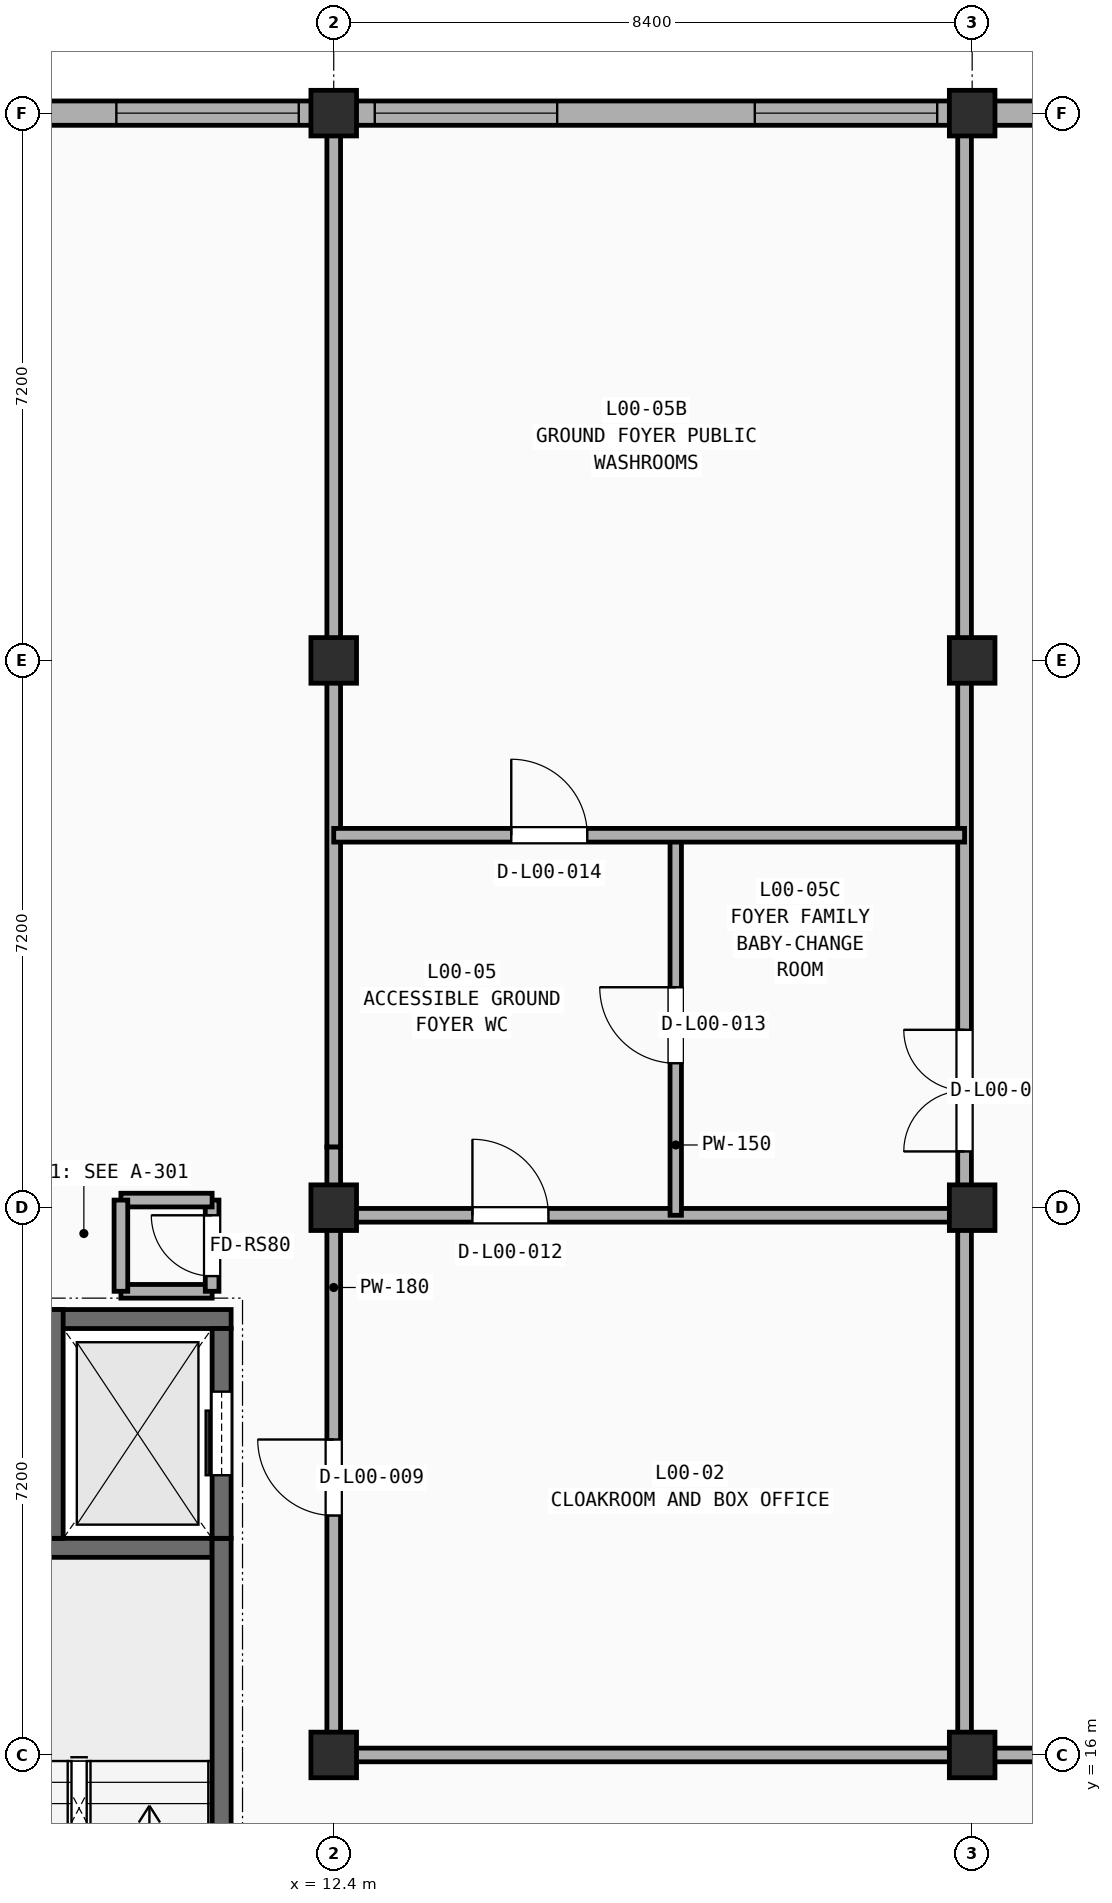
"""IFC4 building model, lengths in metres.
Left out: names, types, materials, properties, quantities, classifications, styles, units other than length and angle.
Written with IfcOpenShell. Run it as: python <this file> out.ifc"""

import sys

from ifc_helpers import new_model, si_unit, direction, frame, frame_2d, origin, origin_2d, place, context, subcontext, project, spatial, rectangle, extrude, element, fill, save


model = new_model("IFC4")
c1 = context("Model", 3, precision=1e-05, world=origin(), true_north=direction((0.0, 1.0)))
c2 = subcontext(c1, "Body", "Model", "MODEL_VIEW")
j1 = project(units=[si_unit("LENGTHUNIT", "METRE"), si_unit("PLANEANGLEUNIT", "RADIAN")], contexts=[c1])
p1 = place(None, origin())
s1 = spatial("IfcSite", under=j1, at=p1, CompositionType="ELEMENT")
p2 = place(p1, origin())
s2 = spatial("IfcBuilding", under=s1, at=p2, CompositionType="ELEMENT")
p3 = place(p2, origin())
s3 = spatial("IfcBuildingStorey", under=s2, at=p3, CompositionType="ELEMENT", Elevation=0.0)
for number, where, z_axis, x_axis in (
    (1, (12.4, 16.0, 0.0), (0.0, 0.0, 1.0), (1.0, 0.0, 0.0)),
    (2, (12.4, 23.2, 0.0), (0.0, 0.0, 1.0), (1.0, 0.0, 0.0)),
    (3, (12.4, 30.4, 0.0), (0.0, 0.0, 1.0), (1.0, 0.0, 0.0)),
    (4, (12.4, 37.6, 0.0), (0.0, 0.0, 1.0), (1.0, 0.0, 0.0)),
    (5, (20.8, 16.0, 0.0), (0.0, 0.0, 1.0), (1.0, 0.0, 0.0)),
    (6, (20.8, 23.2, 0.0), (0.0, 0.0, 1.0), (1.0, 0.0, 0.0)),
    (7, (20.8, 30.4, 0.0), (0.0, 0.0, 1.0), (1.0, 0.0, 0.0)),
    (8, (20.8, 37.6, 0.0), (0.0, 0.0, 1.0), (1.0, 0.0, 0.0)),
):
    element("IfcColumn", number, at=place(p3, frame(where, z_axis=z_axis, x_axis=x_axis)), inside=s3, PredefinedType="COLUMN", context=c2, shape_type="SweptSolid", body=[
        extrude(rectangle(XDim=0.6, YDim=0.6, at=origin_2d()), origin(), (0.0, 0.0, 1.0), 5.4),
    ])
p4 = place(p3, frame((12.4, 16.0, 0.0), z_axis=(0.0, 0.0, 1.0), x_axis=(1.0, 0.0, 0.0)))
e9 = element("IfcWall", 9, at=p4, inside=s3, PredefinedType="PARTITIONING", context=c2, shape_type="SweptSolid", body=[
    extrude(rectangle(XDim=33.45, YDim=0.18, at=frame_2d((16.725, 0.0))), origin(), (0.0, 0.0, 1.0), 3.99),
])
p5 = place(p4, frame((11.147, 0.0, -0.01)))
e10 = element("IfcOpeningElement", 10, at=p5, cuts=e9, PredefinedType="OPENING", context=c2, shape_type="SweptSolid", body=[
    extrude(rectangle(XDim=1.6, YDim=2.21, at=frame_2d((0.8, 1.105))), frame((0.0, 0.1, 0.0), z_axis=(0.0, -1.0, 0.0), x_axis=(1.0, 0.0, 0.0)), (0.0, 0.0, 1.0), 0.2),
])
p6 = place(p3, frame((12.4, 16.0, 0.0), z_axis=(0.0, 0.0, 1.0), x_axis=(0.0, 1.0, 0.0)))
e11 = element("IfcWall", 11, at=p6, inside=s3, PredefinedType="PARTITIONING", context=c2, shape_type="SweptSolid", body=[
    extrude(rectangle(XDim=8.0, YDim=0.18, at=frame_2d((4.0, 0.0))), origin(), (0.0, 0.0, 1.0), 4.54),
])
p7 = place(p6, frame((3.15, 0.0, -0.01)))
e12 = element("IfcOpeningElement", 12, at=p7, cuts=e11, PredefinedType="OPENING", context=c2, shape_type="SweptSolid", body=[
    extrude(rectangle(XDim=1.0, YDim=2.16, at=frame_2d((0.5, 1.08))), frame((0.0, 0.1, 0.0), z_axis=(0.0, -1.0, 0.0), x_axis=(1.0, 0.0, 0.0)), (0.0, 0.0, 1.0), 0.2),
])
p8 = place(p3, frame((12.4, 24.0, 0.0), z_axis=(0.0, 0.0, 1.0), x_axis=(0.0, 1.0, 0.0)))
e13 = element("IfcWall", 13, at=p8, inside=s3, PredefinedType="PARTITIONING", context=c2, shape_type="SweptSolid", body=[
    extrude(rectangle(XDim=13.45, YDim=0.18, at=frame_2d((6.725, 0.0))), origin(), (0.0, 0.0, 1.0), 4.54),
])
p9 = place(p3, frame((20.7, 16.0, 0.0), z_axis=(0.0, 0.0, 1.0), x_axis=(0.0, 1.0, 0.0)))
e14 = element("IfcWall", 14, at=p9, inside=s3, PredefinedType="PARTITIONING", context=c2, shape_type="SweptSolid", body=[
    extrude(rectangle(XDim=21.45, YDim=0.18, at=frame_2d((10.725, 0.0))), origin(), (0.0, 0.0, 1.0), 4.54),
])
p10 = place(p9, frame((7.94, 0.0, -0.01)))
e15 = element("IfcOpeningElement", 15, at=p10, cuts=e14, PredefinedType="OPENING", context=c2, shape_type="SweptSolid", body=[
    extrude(rectangle(XDim=1.6, YDim=2.21, at=frame_2d((0.8, 1.105))), frame((0.0, 0.1, 0.0), z_axis=(0.0, -1.0, 0.0), x_axis=(1.0, 0.0, 0.0)), (0.0, 0.0, 1.0), 0.2),
])
p11 = place(p3, frame((12.4, 23.1, 0.0), z_axis=(0.0, 0.0, 1.0), x_axis=(1.0, 0.0, 0.0)))
e16 = element("IfcWall", 16, at=p11, inside=s3, PredefinedType="PARTITIONING", context=c2, shape_type="SweptSolid", body=[
    extrude(rectangle(XDim=8.3, YDim=0.18, at=frame_2d((4.15, 0.0))), origin(), (0.0, 0.0, 1.0), 4.54),
])
p12 = place(p11, frame((1.825, 0.0, -0.01)))
e17 = element("IfcOpeningElement", 17, at=p12, cuts=e16, PredefinedType="OPENING", context=c2, shape_type="SweptSolid", body=[
    extrude(rectangle(XDim=1.0, YDim=2.16, at=frame_2d((0.5, 1.08))), frame((0.0, 0.1, 0.0), z_axis=(0.0, -1.0, 0.0), x_axis=(1.0, 0.0, 0.0)), (0.0, 0.0, 1.0), 0.2),
])
p13 = place(p3, frame((16.9, 23.1, 0.0), z_axis=(0.0, 0.0, 1.0), x_axis=(0.0, 1.0, 0.0)))
e18 = element("IfcWall", 18, at=p13, inside=s3, PredefinedType="PARTITIONING", context=c2, shape_type="SweptSolid", body=[
    extrude(rectangle(XDim=5.0, YDim=0.15, at=frame_2d((2.5, 0.0))), origin(), (0.0, 0.0, 1.0), 4.54),
])
p14 = place(p13, frame((2.0, 0.0, -0.01)))
e19 = element("IfcOpeningElement", 19, at=p14, cuts=e18, PredefinedType="OPENING", context=c2, shape_type="SweptSolid", body=[
    extrude(rectangle(XDim=1.0, YDim=2.16, at=frame_2d((0.5, 1.08))), frame((0.0, 0.085, 0.0), z_axis=(0.0, -1.0, 0.0), x_axis=(1.0, 0.0, 0.0)), (0.0, 0.0, 1.0), 0.17),
])
p15 = place(p3, frame((12.4, 28.1, 0.0), z_axis=(0.0, 0.0, 1.0), x_axis=(1.0, 0.0, 0.0)))
e20 = element("IfcWall", 20, at=p15, inside=s3, PredefinedType="PARTITIONING", context=c2, shape_type="SweptSolid", body=[
    extrude(rectangle(XDim=8.3, YDim=0.18, at=frame_2d((4.15, 0.0))), origin(), (0.0, 0.0, 1.0), 4.64),
])
p16 = place(p15, frame((2.336, 0.0, -0.01)))
e21 = element("IfcOpeningElement", 21, at=p16, cuts=e20, PredefinedType="OPENING", context=c2, shape_type="SweptSolid", body=[
    extrude(rectangle(XDim=1.0, YDim=2.16, at=frame_2d((0.5, 1.08))), frame((0.0, 0.1, 0.0), z_axis=(0.0, -1.0, 0.0), x_axis=(1.0, 0.0, 0.0)), (0.0, 0.0, 1.0), 0.2),
])
p17 = place(p3, frame((12.4, 37.6, 0.0), z_axis=(0.0, 0.0, 1.0), x_axis=(-1.0, 0.0, 0.0)))
e22 = element("IfcWall", 22, at=p17, inside=s3, PredefinedType="SOLIDWALL", context=c2, shape_type="SweptSolid", body=[
    extrude(rectangle(XDim=8.4, YDim=0.32, at=frame_2d((4.2, 0.0))), origin(), (0.0, 0.0, 1.0), 4.64),
])
p18 = place(p17, frame((0.46, 0.0, 0.9)))
e23 = element("IfcOpeningElement", 23, at=p18, cuts=e22, PredefinedType="OPENING", context=c2, shape_type="SweptSolid", body=[
    extrude(rectangle(XDim=2.4, YDim=2.35, at=frame_2d((1.2, 1.175))), frame((0.0, 0.17, 0.0), z_axis=(0.0, -1.0, 0.0), x_axis=(1.0, 0.0, 0.0)), (0.0, 0.0, 1.0), 0.34),
])
p19 = place(p17, frame((5.46, 0.0, 0.9)))
e24 = element("IfcOpeningElement", 24, at=p19, cuts=e22, PredefinedType="OPENING", context=c2, shape_type="SweptSolid", body=[
    extrude(rectangle(XDim=2.4, YDim=2.35, at=frame_2d((1.2, 1.175))), frame((0.0, 0.17, 0.0), z_axis=(0.0, -1.0, 0.0), x_axis=(1.0, 0.0, 0.0)), (0.0, 0.0, 1.0), 0.34),
])
p20 = place(p3, frame((20.8, 37.6, 0.0), z_axis=(0.0, 0.0, 1.0), x_axis=(-1.0, 0.0, 0.0)))
e25 = element("IfcWall", 25, at=p20, inside=s3, PredefinedType="SOLIDWALL", context=c2, shape_type="SweptSolid", body=[
    extrude(rectangle(XDim=8.4, YDim=0.32, at=frame_2d((4.2, 0.0))), origin(), (0.0, 0.0, 1.0), 4.64),
])
p21 = place(p20, frame((0.46, 0.0, 0.9)))
e26 = element("IfcOpeningElement", 26, at=p21, cuts=e25, PredefinedType="OPENING", context=c2, shape_type="SweptSolid", body=[
    extrude(rectangle(XDim=2.4, YDim=2.35, at=frame_2d((1.2, 1.175))), frame((0.0, 0.17, 0.0), z_axis=(0.0, -1.0, 0.0), x_axis=(1.0, 0.0, 0.0)), (0.0, 0.0, 1.0), 0.34),
])
p22 = place(p20, frame((5.46, 0.0, 0.9)))
e27 = element("IfcOpeningElement", 27, at=p22, cuts=e25, PredefinedType="OPENING", context=c2, shape_type="SweptSolid", body=[
    extrude(rectangle(XDim=2.4, YDim=2.35, at=frame_2d((1.2, 1.175))), frame((0.0, 0.17, 0.0), z_axis=(0.0, -1.0, 0.0), x_axis=(1.0, 0.0, 0.0)), (0.0, 0.0, 1.0), 0.34),
])
p23 = place(p3, frame((29.2, 37.6, 0.0), z_axis=(0.0, 0.0, 1.0), x_axis=(-1.0, 0.0, 0.0)))
e28 = element("IfcWall", 28, at=p23, inside=s3, PredefinedType="SOLIDWALL", context=c2, shape_type="SweptSolid", body=[
    extrude(rectangle(XDim=8.4, YDim=0.32, at=frame_2d((4.2, 0.0))), origin(), (0.0, 0.0, 1.0), 4.64),
])
p24 = place(p23, frame((3.2, 0.0, -0.01)))
e29 = element("IfcOpeningElement", 29, at=p24, cuts=e28, PredefinedType="OPENING", context=c2, shape_type="SweptSolid", body=[
    extrude(rectangle(XDim=2.0, YDim=2.41, at=frame_2d((1.0, 1.205))), frame((0.0, 0.17, 0.0), z_axis=(0.0, -1.0, 0.0), x_axis=(1.0, 0.0, 0.0)), (0.0, 0.0, 1.0), 0.34),
])
p25 = place(p3, frame((10.8, 18.725, 0.0), z_axis=(0.0, 0.0, 1.0), x_axis=(-1.0, 0.0, 0.0)))
e30 = element("IfcWall", 30, at=p25, inside=s3, PredefinedType="SHEAR", context=c2, shape_type="SweptSolid", body=[
    extrude(rectangle(XDim=3.5, YDim=0.25, at=frame_2d((1.75, 0.0))), origin(), (0.0, 0.0, 1.0), 5.4),
])
p26 = place(p3, frame((10.925, 9.95, 0.0), z_axis=(0.0, 0.0, 1.0), x_axis=(0.0, 1.0, 0.0)))
e31 = element("IfcWall", 31, at=p26, inside=s3, PredefinedType="SHEAR", context=c2, shape_type="SweptSolid", body=[
    extrude(rectangle(XDim=8.9, YDim=0.25, at=frame_2d((4.45, 0.0))), origin(), (0.0, 0.0, 1.0), 5.4),
])
p27 = place(p3, frame((8.59, 21.735, 0.0), z_axis=(0.0, 0.0, 1.0), x_axis=(1.0, 0.0, 0.0)))
e32 = element("IfcWall", 32, at=p27, inside=s3, PredefinedType="SHEAR", context=c2, shape_type="SweptSolid", body=[
    extrude(rectangle(XDim=2.46, YDim=0.25, at=frame_2d((1.23, 0.0))), origin(), (0.0, 0.0, 1.0), 5.4),
])
p28 = place(p3, frame((10.925, 18.85, 0.0), z_axis=(0.0, 0.0, 1.0), x_axis=(0.0, 1.0, 0.0)))
e33 = element("IfcWall", 33, at=p28, inside=s3, PredefinedType="SHEAR", context=c2, shape_type="SweptSolid", body=[
    extrude(rectangle(XDim=2.76, YDim=0.25, at=frame_2d((1.38, 0.0))), origin(), (0.0, 0.0, 1.0), 5.4),
])
p29 = place(p28, frame((0.83, 0.0, -0.01)))
e34 = element("IfcOpeningElement", 34, at=p29, cuts=e33, PredefinedType="OPENING", context=c2, shape_type="SweptSolid", body=[
    extrude(rectangle(XDim=1.1, YDim=2.16, at=frame_2d((0.55, 1.08))), frame((0.0, 0.135, 0.0), z_axis=(0.0, -1.0, 0.0), x_axis=(1.0, 0.0, 0.0)), (0.0, 0.0, 1.0), 0.27),
])
p30 = place(p3, frame((8.715, 18.85, 0.0), z_axis=(0.0, 0.0, 1.0), x_axis=(0.0, 1.0, 0.0)))
e35 = element("IfcWall", 35, at=p30, inside=s3, PredefinedType="SHEAR", context=c2, shape_type="SweptSolid", body=[
    extrude(rectangle(XDim=3.01, YDim=0.25, at=frame_2d((1.505, 0.0))), origin(), (0.0, 0.0, 1.0), 5.4),
])
p31 = place(p3, frame((9.6, 22.1, 0.0), z_axis=(0.0, 0.0, 1.0), x_axis=(1.0, 0.0, 0.0)))
e36 = element("IfcWall", 36, at=p31, inside=s3, PredefinedType="SOLIDWALL", context=c2, shape_type="SweptSolid", body=[
    extrude(rectangle(XDim=1.2, YDim=0.18, at=frame_2d((0.6, 0.0))), origin(), (0.0, 0.0, 1.0), 5.07),
])
p32 = place(p3, frame((10.8, 22.1, 0.0), z_axis=(0.0, 0.0, 1.0), x_axis=(0.0, 1.0, 0.0)))
e37 = element("IfcWall", 37, at=p32, inside=s3, PredefinedType="SOLIDWALL", context=c2, shape_type="SweptSolid", body=[
    extrude(rectangle(XDim=1.2, YDim=0.18, at=frame_2d((0.6, 0.0))), origin(), (0.0, 0.0, 1.0), 5.07),
])
p33 = place(p32, frame((0.2, 0.0, -0.01)))
e38 = element("IfcOpeningElement", 38, at=p33, cuts=e37, PredefinedType="OPENING", context=c2, shape_type="SweptSolid", body=[
    extrude(rectangle(XDim=0.8, YDim=2.06, at=frame_2d((0.4, 1.03))), frame((0.0, 0.1, 0.0), z_axis=(0.0, -1.0, 0.0), x_axis=(1.0, 0.0, 0.0)), (0.0, 0.0, 1.0), 0.2),
])
for number, where, z_axis, x_axis in (
    (39, (10.8, 23.3, 0.0), (0.0, 0.0, 1.0), (-1.0, 0.0, 0.0)),
    (40, (9.6, 23.3, 0.0), (0.0, 0.0, 1.0), (0.0, -1.0, 0.0)),
):
    element("IfcWall", number, at=place(p3, frame(where, z_axis=z_axis, x_axis=x_axis)), inside=s3, PredefinedType="SOLIDWALL", context=c2, shape_type="SweptSolid", body=[
        extrude(rectangle(XDim=1.2, YDim=0.18, at=frame_2d((0.6, 0.0))), origin(), (0.0, 0.0, 1.0), 5.07),
    ])
p34 = place(p7, frame((1.0, 0.0, 0.01), z_axis=(0.0, 0.0, 1.0), x_axis=(-1.0, 0.0, 0.0)))
e41 = element("IfcDoor", 41, at=p34, inside=s3, OperationType="SINGLE_SWING_RIGHT", PredefinedType="DOOR", context=c2, shape_type="SweptSolid", body=[
    extrude(rectangle(XDim=1.0, YDim=2.15, at=frame_2d((0.5, 1.075))), frame((0.0, 0.025, 0.0), z_axis=(0.0, -1.0, 0.0), x_axis=(1.0, 0.0, 0.0)), (0.0, 0.0, 1.0), 0.05),
])
fill(e12, e41)
p35 = place(p10, frame((0.0, 0.0, 0.01)))
e42 = element("IfcDoor", 42, at=p35, inside=s3, OperationType="DOUBLE_SWING_LEFT", PredefinedType="DOOR", context=c2, shape_type="SweptSolid", body=[
    extrude(rectangle(XDim=1.6, YDim=2.2, at=frame_2d((0.8, 1.1))), frame((0.0, 0.025, 0.0), z_axis=(0.0, -1.0, 0.0), x_axis=(1.0, 0.0, 0.0)), (0.0, 0.0, 1.0), 0.05),
])
fill(e15, e42)
p36 = place(p12, frame((1.0, 0.0, 0.01), z_axis=(0.0, 0.0, 1.0), x_axis=(-1.0, 0.0, 0.0)))
e43 = element("IfcDoor", 43, at=p36, inside=s3, OperationType="SINGLE_SWING_LEFT", PredefinedType="DOOR", context=c2, shape_type="SweptSolid", body=[
    extrude(rectangle(XDim=1.0, YDim=2.15, at=frame_2d((0.5, 1.075))), frame((0.0, 0.025, 0.0), z_axis=(0.0, -1.0, 0.0), x_axis=(1.0, 0.0, 0.0)), (0.0, 0.0, 1.0), 0.05),
])
fill(e17, e43)
p37 = place(p14, frame((0.0, 0.0, 0.01)))
e44 = element("IfcDoor", 44, at=p37, inside=s3, OperationType="SINGLE_SWING_RIGHT", PredefinedType="DOOR", context=c2, shape_type="SweptSolid", body=[
    extrude(rectangle(XDim=1.0, YDim=2.15, at=frame_2d((0.5, 1.075))), frame((0.0, 0.025, 0.0), z_axis=(0.0, -1.0, 0.0), x_axis=(1.0, 0.0, 0.0)), (0.0, 0.0, 1.0), 0.05),
])
fill(e19, e44)
p38 = place(p16, frame((0.0, 0.0, 0.01)))
e45 = element("IfcDoor", 45, at=p38, inside=s3, OperationType="SINGLE_SWING_LEFT", PredefinedType="DOOR", context=c2, shape_type="SweptSolid", body=[
    extrude(rectangle(XDim=1.0, YDim=2.15, at=frame_2d((0.5, 1.075))), frame((0.0, 0.025, 0.0), z_axis=(0.0, -1.0, 0.0), x_axis=(1.0, 0.0, 0.0)), (0.0, 0.0, 1.0), 0.05),
])
fill(e21, e45)
p39 = place(p18, origin())
e46 = element("IfcWindow", 46, at=p39, inside=s3, PartitioningType="TRIPLE_PANEL_VERTICAL", PredefinedType="WINDOW", context=c2, shape_type="SweptSolid", body=[
    extrude(rectangle(XDim=2.4, YDim=2.35, at=frame_2d((1.2, 1.175))), frame((0.0, 0.03, 0.0), z_axis=(0.0, -1.0, 0.0), x_axis=(1.0, 0.0, 0.0)), (0.0, 0.0, 1.0), 0.06),
])
fill(e23, e46)
p40 = place(p21, origin())
e47 = element("IfcWindow", 47, at=p40, inside=s3, PartitioningType="TRIPLE_PANEL_VERTICAL", PredefinedType="WINDOW", context=c2, shape_type="SweptSolid", body=[
    extrude(rectangle(XDim=2.4, YDim=2.35, at=frame_2d((1.2, 1.175))), frame((0.0, 0.03, 0.0), z_axis=(0.0, -1.0, 0.0), x_axis=(1.0, 0.0, 0.0)), (0.0, 0.0, 1.0), 0.06),
])
fill(e26, e47)
p41 = place(p22, origin())
e48 = element("IfcWindow", 48, at=p41, inside=s3, PartitioningType="TRIPLE_PANEL_VERTICAL", PredefinedType="WINDOW", context=c2, shape_type="SweptSolid", body=[
    extrude(rectangle(XDim=2.4, YDim=2.35, at=frame_2d((1.2, 1.175))), frame((0.0, 0.03, 0.0), z_axis=(0.0, -1.0, 0.0), x_axis=(1.0, 0.0, 0.0)), (0.0, 0.0, 1.0), 0.06),
])
fill(e27, e48)
p42 = place(p29, frame((0.0, 0.0, 0.01)))
e49 = element("IfcDoor", 49, at=p42, inside=s3, OperationType="SLIDING_TO_LEFT", PredefinedType="DOOR", context=c2, shape_type="SweptSolid", body=[
    extrude(rectangle(XDim=1.1, YDim=2.15, at=frame_2d((0.55, 1.075))), frame((0.0, 0.025, 0.0), z_axis=(0.0, -1.0, 0.0), x_axis=(1.0, 0.0, 0.0)), (0.0, 0.0, 1.0), 0.05),
])
fill(e34, e49)
p43 = place(p33, frame((0.0, 0.0, 0.01)))
e50 = element("IfcDoor", 50, at=p43, inside=s3, OperationType="SINGLE_SWING_RIGHT", PredefinedType="DOOR", context=c2, shape_type="SweptSolid", body=[
    extrude(rectangle(XDim=0.8, YDim=2.05, at=frame_2d((0.4, 1.025))), frame((0.0, 0.025, 0.0), z_axis=(0.0, -1.0, 0.0), x_axis=(1.0, 0.0, 0.0)), (0.0, 0.0, 1.0), 0.05),
])
fill(e38, e50)
save(model, sys.argv[1])
